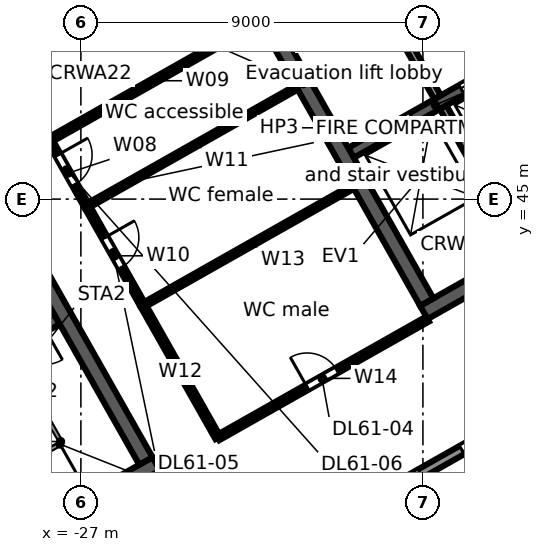
"""IFC4 building model, lengths in metres.
Left out: names, types, materials, properties, quantities, classifications, styles, units other than length and angle.
Written with IfcOpenShell. Run it as: python <this file> out.ifc"""

import sys

from ifc_helpers import new_model, si_unit, direction, frame, frame_2d, origin, place, context, subcontext, project, spatial, rectangle, extrude, element, fill, save


model = new_model("IFC4")
c1 = context("Model", 3, precision=1e-05, world=origin(), true_north=direction((0.0, 1.0)))
c2 = subcontext(c1, "Body", "Model", "MODEL_VIEW")
j1 = project(units=[si_unit("LENGTHUNIT", "METRE"), si_unit("PLANEANGLEUNIT", "RADIAN")], contexts=[c1])
p1 = place(None, origin())
s1 = spatial("IfcSite", under=j1, at=p1, CompositionType="ELEMENT")
p2 = place(p1, origin())
s2 = spatial("IfcBuilding", under=s1, at=p2, CompositionType="ELEMENT")
p3 = place(p2, frame((0.0, 0.0, 274.1)))
s3 = spatial("IfcBuildingStorey", under=s2, at=p3, CompositionType="ELEMENT", Elevation=274.1)
p4 = place(p3, frame((-58.732, 38.771, 0.0), z_axis=(0.0, 0.0, 1.0), x_axis=(0.870355615581, 0.492423702137, 0.0)))
e1 = element("IfcWall", 1, at=p4, inside=s3, PredefinedType="STANDARD", context=c2, shape_type="SweptSolid", body=[
    extrude(rectangle(XDim=64.052, YDim=0.25, at=frame_2d((32.026, 0.0))), origin(), (0.0, 0.0, 1.0), 3.52),
])
p5 = place(p4, frame((61.259, 0.0, 0.8)))
e2 = element("IfcOpeningElement", 2, at=p5, cuts=e1, PredefinedType="OPENING", context=c2, shape_type="SweptSolid", body=[
    extrude(rectangle(XDim=2.4, YDim=2.2, at=frame_2d((1.2, 1.1))), frame((0.0, 0.135, 0.0), z_axis=(0.0, -1.0, 0.0), x_axis=(1.0, 0.0, 0.0)), (0.0, 0.0, 1.0), 0.27),
])
p6 = place(p4, frame((58.216, 0.0, 0.8)))
e3 = element("IfcOpeningElement", 3, at=p6, cuts=e1, PredefinedType="OPENING", context=c2, shape_type="SweptSolid", body=[
    extrude(rectangle(XDim=2.4, YDim=2.2, at=frame_2d((1.2, 1.1))), frame((0.0, 0.135, 0.0), z_axis=(0.0, -1.0, 0.0), x_axis=(1.0, 0.0, 0.0)), (0.0, 0.0, 1.0), 0.27),
])
p7 = place(p4, frame((55.173, 0.0, 0.8)))
e4 = element("IfcOpeningElement", 4, at=p7, cuts=e1, PredefinedType="OPENING", context=c2, shape_type="SweptSolid", body=[
    extrude(rectangle(XDim=2.4, YDim=2.2, at=frame_2d((1.2, 1.1))), frame((0.0, 0.135, 0.0), z_axis=(0.0, -1.0, 0.0), x_axis=(1.0, 0.0, 0.0)), (0.0, 0.0, 1.0), 0.27),
])
p8 = place(p4, frame((52.129, 0.0, 0.8)))
e5 = element("IfcOpeningElement", 5, at=p8, cuts=e1, PredefinedType="OPENING", context=c2, shape_type="SweptSolid", body=[
    extrude(rectangle(XDim=2.4, YDim=2.2, at=frame_2d((1.2, 1.1))), frame((0.0, 0.135, 0.0), z_axis=(0.0, -1.0, 0.0), x_axis=(1.0, 0.0, 0.0)), (0.0, 0.0, 1.0), 0.27),
])
p9 = place(p4, frame((49.086, 0.0, 0.8)))
e6 = element("IfcOpeningElement", 6, at=p9, cuts=e1, PredefinedType="OPENING", context=c2, shape_type="SweptSolid", body=[
    extrude(rectangle(XDim=2.4, YDim=2.2, at=frame_2d((1.2, 1.1))), frame((0.0, 0.135, 0.0), z_axis=(0.0, -1.0, 0.0), x_axis=(1.0, 0.0, 0.0)), (0.0, 0.0, 1.0), 0.27),
])
p10 = place(p4, frame((46.043, 0.0, 0.8)))
e7 = element("IfcOpeningElement", 7, at=p10, cuts=e1, PredefinedType="OPENING", context=c2, shape_type="SweptSolid", body=[
    extrude(rectangle(XDim=2.4, YDim=2.2, at=frame_2d((1.2, 1.1))), frame((0.0, 0.135, 0.0), z_axis=(0.0, -1.0, 0.0), x_axis=(1.0, 0.0, 0.0)), (0.0, 0.0, 1.0), 0.27),
])
p11 = place(p4, frame((43.0, 0.0, 0.8)))
e8 = element("IfcOpeningElement", 8, at=p11, cuts=e1, PredefinedType="OPENING", context=c2, shape_type="SweptSolid", body=[
    extrude(rectangle(XDim=2.4, YDim=2.2, at=frame_2d((1.2, 1.1))), frame((0.0, 0.135, 0.0), z_axis=(0.0, -1.0, 0.0), x_axis=(1.0, 0.0, 0.0)), (0.0, 0.0, 1.0), 0.27),
])
p12 = place(p4, frame((39.956, 0.0, 0.8)))
e9 = element("IfcOpeningElement", 9, at=p12, cuts=e1, PredefinedType="OPENING", context=c2, shape_type="SweptSolid", body=[
    extrude(rectangle(XDim=2.4, YDim=2.2, at=frame_2d((1.2, 1.1))), frame((0.0, 0.135, 0.0), z_axis=(0.0, -1.0, 0.0), x_axis=(1.0, 0.0, 0.0)), (0.0, 0.0, 1.0), 0.27),
])
p13 = place(p4, frame((36.913, 0.0, 0.8)))
e10 = element("IfcOpeningElement", 10, at=p13, cuts=e1, PredefinedType="OPENING", context=c2, shape_type="SweptSolid", body=[
    extrude(rectangle(XDim=2.4, YDim=2.2, at=frame_2d((1.2, 1.1))), frame((0.0, 0.135, 0.0), z_axis=(0.0, -1.0, 0.0), x_axis=(1.0, 0.0, 0.0)), (0.0, 0.0, 1.0), 0.27),
])
p14 = place(p4, frame((33.87, 0.0, 0.8)))
e11 = element("IfcOpeningElement", 11, at=p14, cuts=e1, PredefinedType="OPENING", context=c2, shape_type="SweptSolid", body=[
    extrude(rectangle(XDim=2.4, YDim=2.2, at=frame_2d((1.2, 1.1))), frame((0.0, 0.135, 0.0), z_axis=(0.0, -1.0, 0.0), x_axis=(1.0, 0.0, 0.0)), (0.0, 0.0, 1.0), 0.27),
])
p15 = place(p4, frame((30.826, 0.0, 0.8)))
e12 = element("IfcOpeningElement", 12, at=p15, cuts=e1, PredefinedType="OPENING", context=c2, shape_type="SweptSolid", body=[
    extrude(rectangle(XDim=2.4, YDim=2.2, at=frame_2d((1.2, 1.1))), frame((0.0, 0.135, 0.0), z_axis=(0.0, -1.0, 0.0), x_axis=(1.0, 0.0, 0.0)), (0.0, 0.0, 1.0), 0.27),
])
p16 = place(p4, frame((27.783, 0.0, 0.8)))
e13 = element("IfcOpeningElement", 13, at=p16, cuts=e1, PredefinedType="OPENING", context=c2, shape_type="SweptSolid", body=[
    extrude(rectangle(XDim=2.4, YDim=2.2, at=frame_2d((1.2, 1.1))), frame((0.0, 0.135, 0.0), z_axis=(0.0, -1.0, 0.0), x_axis=(1.0, 0.0, 0.0)), (0.0, 0.0, 1.0), 0.27),
])
p17 = place(p4, frame((24.74, 0.0, 0.8)))
e14 = element("IfcOpeningElement", 14, at=p17, cuts=e1, PredefinedType="OPENING", context=c2, shape_type="SweptSolid", body=[
    extrude(rectangle(XDim=2.4, YDim=2.2, at=frame_2d((1.2, 1.1))), frame((0.0, 0.135, 0.0), z_axis=(0.0, -1.0, 0.0), x_axis=(1.0, 0.0, 0.0)), (0.0, 0.0, 1.0), 0.27),
])
p18 = place(p4, frame((21.696, 0.0, 0.8)))
e15 = element("IfcOpeningElement", 15, at=p18, cuts=e1, PredefinedType="OPENING", context=c2, shape_type="SweptSolid", body=[
    extrude(rectangle(XDim=2.4, YDim=2.2, at=frame_2d((1.2, 1.1))), frame((0.0, 0.135, 0.0), z_axis=(0.0, -1.0, 0.0), x_axis=(1.0, 0.0, 0.0)), (0.0, 0.0, 1.0), 0.27),
])
p19 = place(p4, frame((18.653, 0.0, 0.8)))
e16 = element("IfcOpeningElement", 16, at=p19, cuts=e1, PredefinedType="OPENING", context=c2, shape_type="SweptSolid", body=[
    extrude(rectangle(XDim=2.4, YDim=2.2, at=frame_2d((1.2, 1.1))), frame((0.0, 0.135, 0.0), z_axis=(0.0, -1.0, 0.0), x_axis=(1.0, 0.0, 0.0)), (0.0, 0.0, 1.0), 0.27),
])
p20 = place(p4, frame((15.61, 0.0, 0.8)))
e17 = element("IfcOpeningElement", 17, at=p20, cuts=e1, PredefinedType="OPENING", context=c2, shape_type="SweptSolid", body=[
    extrude(rectangle(XDim=2.4, YDim=2.2, at=frame_2d((1.2, 1.1))), frame((0.0, 0.135, 0.0), z_axis=(0.0, -1.0, 0.0), x_axis=(1.0, 0.0, 0.0)), (0.0, 0.0, 1.0), 0.27),
])
p21 = place(p4, frame((12.567, 0.0, 0.8)))
e18 = element("IfcOpeningElement", 18, at=p21, cuts=e1, PredefinedType="OPENING", context=c2, shape_type="SweptSolid", body=[
    extrude(rectangle(XDim=2.4, YDim=2.2, at=frame_2d((1.2, 1.1))), frame((0.0, 0.135, 0.0), z_axis=(0.0, -1.0, 0.0), x_axis=(1.0, 0.0, 0.0)), (0.0, 0.0, 1.0), 0.27),
])
p22 = place(p4, frame((9.523, 0.0, 0.8)))
e19 = element("IfcOpeningElement", 19, at=p22, cuts=e1, PredefinedType="OPENING", context=c2, shape_type="SweptSolid", body=[
    extrude(rectangle(XDim=2.4, YDim=2.2, at=frame_2d((1.2, 1.1))), frame((0.0, 0.135, 0.0), z_axis=(0.0, -1.0, 0.0), x_axis=(1.0, 0.0, 0.0)), (0.0, 0.0, 1.0), 0.27),
])
p23 = place(p4, frame((6.48, 0.0, 0.8)))
e20 = element("IfcOpeningElement", 20, at=p23, cuts=e1, PredefinedType="OPENING", context=c2, shape_type="SweptSolid", body=[
    extrude(rectangle(XDim=2.4, YDim=2.2, at=frame_2d((1.2, 1.1))), frame((0.0, 0.135, 0.0), z_axis=(0.0, -1.0, 0.0), x_axis=(1.0, 0.0, 0.0)), (0.0, 0.0, 1.0), 0.27),
])
p24 = place(p4, frame((3.437, 0.0, 0.8)))
e21 = element("IfcOpeningElement", 21, at=p24, cuts=e1, PredefinedType="OPENING", context=c2, shape_type="SweptSolid", body=[
    extrude(rectangle(XDim=2.4, YDim=2.2, at=frame_2d((1.2, 1.1))), frame((0.0, 0.135, 0.0), z_axis=(0.0, -1.0, 0.0), x_axis=(1.0, 0.0, 0.0)), (0.0, 0.0, 1.0), 0.27),
])
p25 = place(p4, frame((0.393, 0.0, 0.8)))
e22 = element("IfcOpeningElement", 22, at=p25, cuts=e1, PredefinedType="OPENING", context=c2, shape_type="SweptSolid", body=[
    extrude(rectangle(XDim=2.4, YDim=2.2, at=frame_2d((1.2, 1.1))), frame((0.0, 0.135, 0.0), z_axis=(0.0, -1.0, 0.0), x_axis=(1.0, 0.0, 0.0)), (0.0, 0.0, 1.0), 0.27),
])
p26 = place(p3, frame((-3.017, 46.293, 0.0), z_axis=(0.0, 0.0, 1.0), x_axis=(-0.870355474887, -0.492423950812, 0.0)))
e23 = element("IfcWall", 23, at=p26, inside=s3, PredefinedType="STANDARD", context=c2, shape_type="SweptSolid", body=[
    extrude(rectangle(XDim=40.34, YDim=0.25, at=frame_2d((20.17, 0.0))), origin(), (0.0, 0.0, 1.0), 3.52),
])
p27 = place(p26, frame((37.428, 0.0, 0.8)))
e24 = element("IfcOpeningElement", 24, at=p27, cuts=e23, PredefinedType="OPENING", context=c2, shape_type="SweptSolid", body=[
    extrude(rectangle(XDim=2.4, YDim=2.2, at=frame_2d((1.2, 1.1))), frame((0.0, 0.135, 0.0), z_axis=(0.0, -1.0, 0.0), x_axis=(1.0, 0.0, 0.0)), (0.0, 0.0, 1.0), 0.27),
])
p28 = place(p26, frame((34.372, 0.0, 0.0)))
e25 = element("IfcOpeningElement", 25, at=p28, cuts=e23, PredefinedType="OPENING", context=c2, shape_type="SweptSolid", body=[
    extrude(rectangle(XDim=1.8, YDim=2.4, at=frame_2d((0.9, 1.2))), frame((0.0, 0.135, 0.0), z_axis=(0.0, -1.0, 0.0), x_axis=(1.0, 0.0, 0.0)), (0.0, 0.0, 1.0), 0.27),
])
p29 = place(p26, frame((30.716, 0.0, 0.8)))
e26 = element("IfcOpeningElement", 26, at=p29, cuts=e23, PredefinedType="OPENING", context=c2, shape_type="SweptSolid", body=[
    extrude(rectangle(XDim=2.4, YDim=2.2, at=frame_2d((1.2, 1.1))), frame((0.0, 0.135, 0.0), z_axis=(0.0, -1.0, 0.0), x_axis=(1.0, 0.0, 0.0)), (0.0, 0.0, 1.0), 0.27),
])
p30 = place(p26, frame((27.36, 0.0, 0.8)))
e27 = element("IfcOpeningElement", 27, at=p30, cuts=e23, PredefinedType="OPENING", context=c2, shape_type="SweptSolid", body=[
    extrude(rectangle(XDim=2.4, YDim=2.2, at=frame_2d((1.2, 1.1))), frame((0.0, 0.135, 0.0), z_axis=(0.0, -1.0, 0.0), x_axis=(1.0, 0.0, 0.0)), (0.0, 0.0, 1.0), 0.27),
])
p31 = place(p26, frame((24.304, 0.0, 0.0)))
e28 = element("IfcOpeningElement", 28, at=p31, cuts=e23, PredefinedType="OPENING", context=c2, shape_type="SweptSolid", body=[
    extrude(rectangle(XDim=1.8, YDim=2.4, at=frame_2d((0.9, 1.2))), frame((0.0, 0.135, 0.0), z_axis=(0.0, -1.0, 0.0), x_axis=(1.0, 0.0, 0.0)), (0.0, 0.0, 1.0), 0.27),
])
p32 = place(p26, frame((20.648, 0.0, 0.8)))
e29 = element("IfcOpeningElement", 29, at=p32, cuts=e23, PredefinedType="OPENING", context=c2, shape_type="SweptSolid", body=[
    extrude(rectangle(XDim=2.4, YDim=2.2, at=frame_2d((1.2, 1.1))), frame((0.0, 0.135, 0.0), z_axis=(0.0, -1.0, 0.0), x_axis=(1.0, 0.0, 0.0)), (0.0, 0.0, 1.0), 0.27),
])
p33 = place(p26, frame((17.292, 0.0, 0.8)))
e30 = element("IfcOpeningElement", 30, at=p33, cuts=e23, PredefinedType="OPENING", context=c2, shape_type="SweptSolid", body=[
    extrude(rectangle(XDim=2.4, YDim=2.2, at=frame_2d((1.2, 1.1))), frame((0.0, 0.135, 0.0), z_axis=(0.0, -1.0, 0.0), x_axis=(1.0, 0.0, 0.0)), (0.0, 0.0, 1.0), 0.27),
])
p34 = place(p26, frame((14.236, 0.0, 0.0)))
e31 = element("IfcOpeningElement", 31, at=p34, cuts=e23, PredefinedType="OPENING", context=c2, shape_type="SweptSolid", body=[
    extrude(rectangle(XDim=1.8, YDim=2.4, at=frame_2d((0.9, 1.2))), frame((0.0, 0.135, 0.0), z_axis=(0.0, -1.0, 0.0), x_axis=(1.0, 0.0, 0.0)), (0.0, 0.0, 1.0), 0.27),
])
p35 = place(p26, frame((10.58, 0.0, 0.8)))
e32 = element("IfcOpeningElement", 32, at=p35, cuts=e23, PredefinedType="OPENING", context=c2, shape_type="SweptSolid", body=[
    extrude(rectangle(XDim=2.4, YDim=2.2, at=frame_2d((1.2, 1.1))), frame((0.0, 0.135, 0.0), z_axis=(0.0, -1.0, 0.0), x_axis=(1.0, 0.0, 0.0)), (0.0, 0.0, 1.0), 0.27),
])
p36 = place(p26, frame((7.224, 0.0, 0.8)))
e33 = element("IfcOpeningElement", 33, at=p36, cuts=e23, PredefinedType="OPENING", context=c2, shape_type="SweptSolid", body=[
    extrude(rectangle(XDim=2.4, YDim=2.2, at=frame_2d((1.2, 1.1))), frame((0.0, 0.135, 0.0), z_axis=(0.0, -1.0, 0.0), x_axis=(1.0, 0.0, 0.0)), (0.0, 0.0, 1.0), 0.27),
])
p37 = place(p26, frame((4.168, 0.0, 0.0)))
e34 = element("IfcOpeningElement", 34, at=p37, cuts=e23, PredefinedType="OPENING", context=c2, shape_type="SweptSolid", body=[
    extrude(rectangle(XDim=1.8, YDim=2.4, at=frame_2d((0.9, 1.2))), frame((0.0, 0.135, 0.0), z_axis=(0.0, -1.0, 0.0), x_axis=(1.0, 0.0, 0.0)), (0.0, 0.0, 1.0), 0.27),
])
p38 = place(p26, frame((0.512, 0.0, 0.8)))
e35 = element("IfcOpeningElement", 35, at=p38, cuts=e23, PredefinedType="OPENING", context=c2, shape_type="SweptSolid", body=[
    extrude(rectangle(XDim=2.4, YDim=2.2, at=frame_2d((1.2, 1.1))), frame((0.0, 0.135, 0.0), z_axis=(0.0, -1.0, 0.0), x_axis=(1.0, 0.0, 0.0)), (0.0, 0.0, 1.0), 0.27),
])
p39 = place(p3, frame((-39.813, 29.662, 0.0), z_axis=(0.0, 0.0, 1.0), x_axis=(0.870350116061, 0.492433422375, 0.0)))
e36 = element("IfcWall", 36, at=p39, inside=s3, PredefinedType="SOLIDWALL", context=c2, shape_type="SweptSolid", body=[
    extrude(rectangle(XDim=17.0, YDim=0.4, at=frame_2d((8.5, 0.0))), origin(), (0.0, 0.0, 1.0), 3.52),
])
p40 = place(p39, frame((7.2, 0.0, 0.0)))
e37 = element("IfcOpeningElement", 37, at=p40, cuts=e36, PredefinedType="OPENING", context=c2, shape_type="SweptSolid", body=[
    extrude(rectangle(XDim=1.2, YDim=2.1, at=frame_2d((0.6, 1.05))), frame((0.0, 0.21, 0.0), z_axis=(0.0, -1.0, 0.0), x_axis=(1.0, 0.0, 0.0)), (0.0, 0.0, 1.0), 0.42),
])
p41 = place(p3, frame((-34.245, 38.097, 0.0), z_axis=(0.0, 0.0, 1.0), x_axis=(0.870356351998, 0.492422400523, 0.0)))
e38 = element("IfcWall", 38, at=p41, inside=s3, PredefinedType="SOLIDWALL", context=c2, shape_type="SweptSolid", body=[
    extrude(rectangle(XDim=7.6, YDim=0.3, at=frame_2d((3.8, 0.0))), origin(), (0.0, 0.0, 1.0), 3.52),
])
p42 = place(p41, frame((6.2, 0.0, 0.0)))
e39 = element("IfcOpeningElement", 39, at=p42, cuts=e38, PredefinedType="OPENING", context=c2, shape_type="SweptSolid", body=[
    extrude(rectangle(XDim=1.0, YDim=2.1, at=frame_2d((0.5, 1.05))), frame((0.0, 0.16, 0.0), z_axis=(0.0, -1.0, 0.0), x_axis=(1.0, 0.0, 0.0)), (0.0, 0.0, 1.0), 0.32),
])
p43 = place(p3, frame((-31.79, 49.597, 0.0), z_axis=(0.0, 0.0, 1.0), x_axis=(0.492421663121, -0.870356769198, 0.0)))
e40 = element("IfcWall", 40, at=p43, inside=s3, PredefinedType="SOLIDWALL", context=c2, shape_type="SweptSolid", body=[
    extrude(rectangle(XDim=13.2, YDim=0.4, at=frame_2d((6.6, 0.0))), origin(), (0.0, 0.0, 1.0), 3.52),
])
p44 = place(p3, frame((-17.975, 42.017, 0.0), z_axis=(0.0, 0.0, 1.0), x_axis=(0.87034965173, 0.492434243055, 0.0)))
e41 = element("IfcWall", 41, at=p44, inside=s3, PredefinedType="SOLIDWALL", context=c2, shape_type="SweptSolid", body=[
    extrude(rectangle(XDim=15.0, YDim=0.4, at=frame_2d((7.5, 0.0))), origin(), (0.0, 0.0, 1.0), 3.52),
])
p45 = place(p44, frame((6.1, 0.0, 0.0)))
e42 = element("IfcOpeningElement", 42, at=p45, cuts=e41, PredefinedType="OPENING", context=c2, shape_type="SweptSolid", body=[
    extrude(rectangle(XDim=1.2, YDim=2.1, at=frame_2d((0.6, 1.05))), frame((0.0, 0.21, 0.0), z_axis=(0.0, -1.0, 0.0), x_axis=(1.0, 0.0, 0.0)), (0.0, 0.0, 1.0), 0.42),
])
p46 = place(p3, frame((-19.892, 46.218, 0.0), z_axis=(0.0, 0.0, 1.0), x_axis=(0.870341639186, 0.492448404505, 0.0)))
e43 = element("IfcWall", 43, at=p46, inside=s3, PredefinedType="SOLIDWALL", context=c2, shape_type="SweptSolid", body=[
    extrude(rectangle(XDim=5.1, YDim=0.3, at=frame_2d((2.55, 0.0))), origin(), (0.0, 0.0, 1.0), 3.52),
])
p47 = place(p46, frame((0.75, 0.0, 0.0)))
e44 = element("IfcOpeningElement", 44, at=p47, cuts=e43, PredefinedType="OPENING", context=c2, shape_type="SweptSolid", body=[
    extrude(rectangle(XDim=1.1, YDim=2.1, at=frame_2d((0.55, 1.05))), frame((0.0, 0.16, 0.0), z_axis=(0.0, -1.0, 0.0), x_axis=(1.0, 0.0, 0.0)), (0.0, 0.0, 1.0), 0.32),
])
p48 = place(p46, frame((3.35, 0.0, 0.0)))
e45 = element("IfcOpeningElement", 45, at=p48, cuts=e43, PredefinedType="OPENING", context=c2, shape_type="SweptSolid", body=[
    extrude(rectangle(XDim=1.1, YDim=2.1, at=frame_2d((0.55, 1.05))), frame((0.0, 0.16, 0.0), z_axis=(0.0, -1.0, 0.0), x_axis=(1.0, 0.0, 0.0)), (0.0, 0.0, 1.0), 0.32),
])
p49 = place(p3, frame((-24.4, 53.779, 0.0), z_axis=(0.0, 0.0, 1.0), x_axis=(0.492421663121, -0.870356769198, 0.0)))
e46 = element("IfcWall", 46, at=p49, inside=s3, PredefinedType="SOLIDWALL", context=c2, shape_type="SweptSolid", body=[
    extrude(rectangle(XDim=13.2, YDim=0.4, at=frame_2d((6.6, 0.0))), origin(), (0.0, 0.0, 1.0), 3.52),
])
p50 = place(p3, frame((-17.469, 47.417, 0.0), z_axis=(0.0, 0.0, 1.0), x_axis=(0.492466057713, -0.870331650579, 0.0)))
e47 = element("IfcWall", 47, at=p50, inside=s3, PredefinedType="SOLIDWALL", context=c2, shape_type="SweptSolid", body=[
    extrude(rectangle(XDim=4.25, YDim=0.2, at=frame_2d((2.125, 0.0))), origin(), (0.0, 0.0, 1.0), 3.52),
])
p51 = place(p3, frame((-19.635, 51.246, 0.0), z_axis=(0.0, 0.0, 1.0), x_axis=(0.492408451753, -0.87036424366, 0.0)))
e48 = element("IfcWall", 48, at=p51, inside=s3, PredefinedType="PARTITIONING", context=c2, shape_type="SweptSolid", body=[
    extrude(rectangle(XDim=4.1, YDim=0.2, at=frame_2d((2.05, 0.0))), origin(), (0.0, 0.0, 1.0), 3.52),
])
p52 = place(p51, frame((1.55, 0.0, 0.0)))
e49 = element("IfcOpeningElement", 49, at=p52, cuts=e48, PredefinedType="OPENING", context=c2, shape_type="SweptSolid", body=[
    extrude(rectangle(XDim=1.0, YDim=2.1, at=frame_2d((0.5, 1.05))), frame((0.0, 0.11, 0.0), z_axis=(0.0, -1.0, 0.0), x_axis=(1.0, 0.0, 0.0)), (0.0, 0.0, 1.0), 0.22),
])
p53 = place(p3, frame((-27.827, 46.554, 0.0), z_axis=(0.0, 0.0, 1.0), x_axis=(0.492374954878, -0.870383193662, 0.0)))
e50 = element("IfcWall", 50, at=p53, inside=s3, PredefinedType="PARTITIONING", context=c2, shape_type="SweptSolid", body=[
    extrude(rectangle(XDim=2.0, YDim=0.15, at=frame_2d((1.0, 0.0))), origin(), (0.0, 0.0, 1.0), 2.792),
])
p54 = place(p53, frame((0.45, 0.0, 0.0)))
e51 = element("IfcOpeningElement", 51, at=p54, cuts=e50, PredefinedType="OPENING", context=c2, shape_type="SweptSolid", body=[
    extrude(rectangle(XDim=0.9, YDim=2.1, at=frame_2d((0.45, 1.05))), frame((0.0, 0.085, 0.0), z_axis=(0.0, -1.0, 0.0), x_axis=(1.0, 0.0, 0.0)), (0.0, 0.0, 1.0), 0.17),
])
p55 = place(p3, frame((-27.827, 46.554, 0.0), z_axis=(0.0, 0.0, 1.0), x_axis=(0.870339695563, 0.492451839602, 0.0)))
e52 = element("IfcWall", 52, at=p55, inside=s3, PredefinedType="PARTITIONING", context=c2, shape_type="SweptSolid", body=[
    extrude(rectangle(XDim=6.34, YDim=0.15, at=frame_2d((3.17, 0.0))), origin(), (0.0, 0.0, 1.0), 2.792),
])
p56 = place(p3, frame((-26.842, 44.813, 0.0), z_axis=(0.0, 0.0, 1.0), x_axis=(0.492365617434, -0.870388475779, 0.0)))
e53 = element("IfcWall", 53, at=p56, inside=s3, PredefinedType="PARTITIONING", context=c2, shape_type="SweptSolid", body=[
    extrude(rectangle(XDim=3.0, YDim=0.15, at=frame_2d((1.5, 0.0))), origin(), (0.0, 0.0, 1.0), 2.792),
])
p57 = place(p56, frame((0.95, 0.0, 0.0)))
e54 = element("IfcOpeningElement", 54, at=p57, cuts=e53, PredefinedType="OPENING", context=c2, shape_type="SweptSolid", body=[
    extrude(rectangle(XDim=0.9, YDim=2.1, at=frame_2d((0.45, 1.05))), frame((0.0, 0.085, 0.0), z_axis=(0.0, -1.0, 0.0), x_axis=(1.0, 0.0, 0.0)), (0.0, 0.0, 1.0), 0.17),
])
p58 = place(p3, frame((-26.842, 44.813, 0.0), z_axis=(0.0, 0.0, 1.0), x_axis=(0.870283015025, 0.492552001071, 0.0)))
e55 = element("IfcWall", 55, at=p58, inside=s3, PredefinedType="PARTITIONING", context=c2, shape_type="SweptSolid", body=[
    extrude(rectangle(XDim=6.341, YDim=0.125, at=frame_2d((3.17, 0.0))), origin(), (0.0, 0.0, 1.0), 2.792),
])
p59 = place(p3, frame((-25.365, 42.202, 0.0), z_axis=(0.0, 0.0, 1.0), x_axis=(0.492525823506, -0.870297830159, 0.0)))
e56 = element("IfcWall", 56, at=p59, inside=s3, PredefinedType="PARTITIONING", context=c2, shape_type="SweptSolid", body=[
    extrude(rectangle(XDim=4.0, YDim=0.15, at=frame_2d((2.0, 0.0))), origin(), (0.0, 0.0, 1.0), 3.52),
])
p60 = place(p3, frame((-25.365, 42.202, 0.0), z_axis=(0.0, 0.0, 1.0), x_axis=(0.870320373616, 0.492485986875, 0.0)))
e57 = element("IfcWall", 57, at=p60, inside=s3, PredefinedType="PARTITIONING", context=c2, shape_type="SweptSolid", body=[
    extrude(rectangle(XDim=6.341, YDim=0.125, at=frame_2d((3.171, 0.0))), origin(), (0.0, 0.0, 1.0), 3.52),
])
p61 = place(p3, frame((-23.395, 38.721, 0.0), z_axis=(0.0, 0.0, 1.0), x_axis=(0.870349033841, 0.492435335137, 0.0)))
e58 = element("IfcWall", 58, at=p61, inside=s3, PredefinedType="PARTITIONING", context=c2, shape_type="SweptSolid", body=[
    extrude(rectangle(XDim=6.34, YDim=0.15, at=frame_2d((3.17, 0.0))), origin(), (0.0, 0.0, 1.0), 3.52),
])
p62 = place(p61, frame((2.7, 0.0, 0.0)))
e59 = element("IfcOpeningElement", 59, at=p62, cuts=e58, PredefinedType="OPENING", context=c2, shape_type="SweptSolid", body=[
    extrude(rectangle(XDim=0.9, YDim=2.1, at=frame_2d((0.45, 1.05))), frame((0.0, 0.085, 0.0), z_axis=(0.0, -1.0, 0.0), x_axis=(1.0, 0.0, 0.0)), (0.0, 0.0, 1.0), 0.17),
])
p63 = place(p34, origin())
e60 = element("IfcDoor", 60, at=p63, inside=s3, OperationType="DOUBLE_DOOR_SINGLE_SWING", PredefinedType="DOOR", context=c2, shape_type="SweptSolid", body=[
    extrude(rectangle(XDim=1.8, YDim=2.4, at=frame_2d((0.9, 1.2))), frame((0.0, 0.025, 0.0), z_axis=(0.0, -1.0, 0.0), x_axis=(1.0, 0.0, 0.0)), (0.0, 0.0, 1.0), 0.05),
])
fill(e31, e60)
p64 = place(p47, origin())
e61 = element("IfcDoor", 61, at=p64, inside=s3, OperationType="DOUBLE_DOOR_SLIDING", PredefinedType="DOOR", context=c2, shape_type="SweptSolid", body=[
    extrude(rectangle(XDim=1.1, YDim=2.1, at=frame_2d((0.55, 1.05))), frame((0.0, 0.025, 0.0), z_axis=(0.0, -1.0, 0.0), x_axis=(1.0, 0.0, 0.0)), (0.0, 0.0, 1.0), 0.05),
])
fill(e44, e61)
p65 = place(p48, origin())
e62 = element("IfcDoor", 62, at=p65, inside=s3, OperationType="DOUBLE_DOOR_SLIDING", PredefinedType="DOOR", context=c2, shape_type="SweptSolid", body=[
    extrude(rectangle(XDim=1.1, YDim=2.1, at=frame_2d((0.55, 1.05))), frame((0.0, 0.025, 0.0), z_axis=(0.0, -1.0, 0.0), x_axis=(1.0, 0.0, 0.0)), (0.0, 0.0, 1.0), 0.05),
])
fill(e45, e62)
p66 = place(p62, origin())
e63 = element("IfcDoor", 63, at=p66, inside=s3, OperationType="SINGLE_SWING_LEFT", PredefinedType="DOOR", context=c2, shape_type="SweptSolid", body=[
    extrude(rectangle(XDim=0.9, YDim=2.1, at=frame_2d((0.45, 1.05))), frame((0.0, 0.025, 0.0), z_axis=(0.0, -1.0, 0.0), x_axis=(1.0, 0.0, 0.0)), (0.0, 0.0, 1.0), 0.05),
])
fill(e59, e63)
p67 = place(p57, origin())
e64 = element("IfcDoor", 64, at=p67, inside=s3, OperationType="SINGLE_SWING_LEFT", PredefinedType="DOOR", context=c2, shape_type="SweptSolid", body=[
    extrude(rectangle(XDim=0.9, YDim=2.1, at=frame_2d((0.45, 1.05))), frame((0.0, 0.025, 0.0), z_axis=(0.0, -1.0, 0.0), x_axis=(1.0, 0.0, 0.0)), (0.0, 0.0, 1.0), 0.05),
])
fill(e54, e64)
p68 = place(p54, origin())
e65 = element("IfcDoor", 65, at=p68, inside=s3, OperationType="SINGLE_SWING_LEFT", PredefinedType="DOOR", context=c2, shape_type="SweptSolid", body=[
    extrude(rectangle(XDim=0.9, YDim=2.1, at=frame_2d((0.45, 1.05))), frame((0.0, 0.025, 0.0), z_axis=(0.0, -1.0, 0.0), x_axis=(1.0, 0.0, 0.0)), (0.0, 0.0, 1.0), 0.05),
])
fill(e51, e65)
save(model, sys.argv[1])
